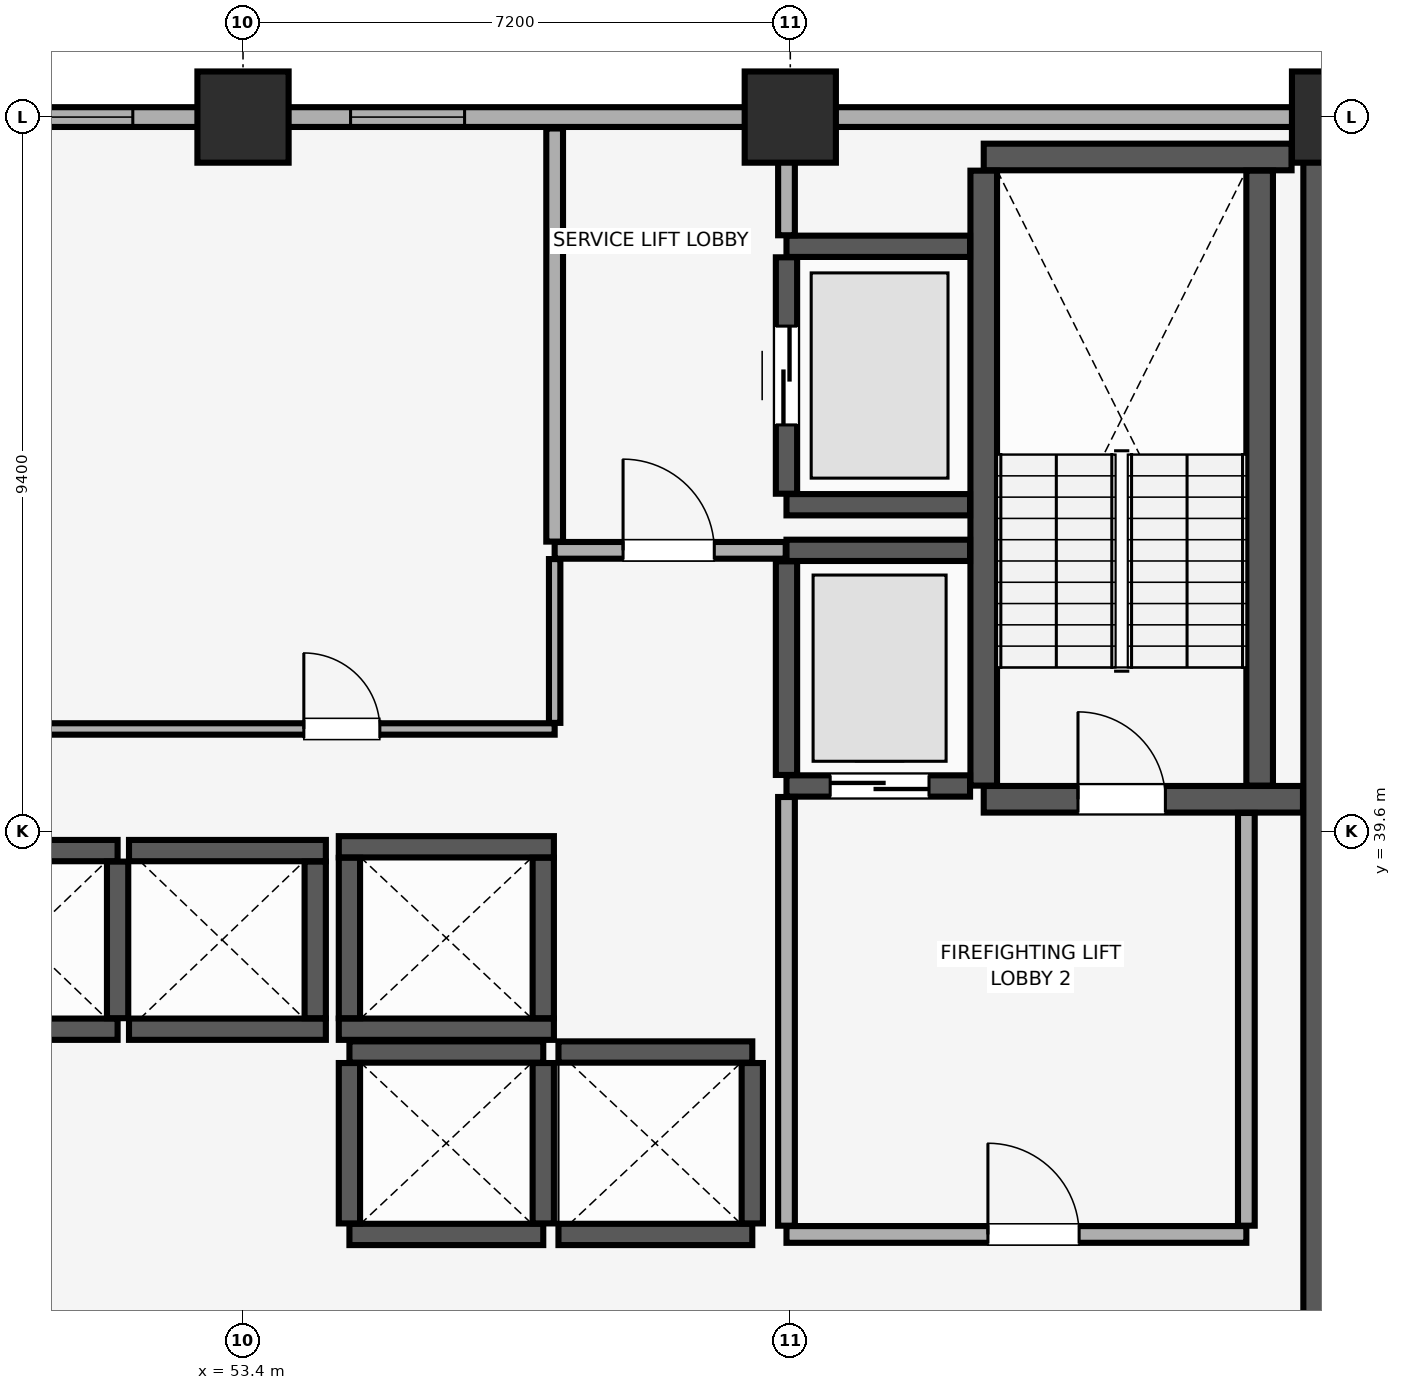
"""IFC4 building model, lengths in metres.
Left out: names, types, materials, properties, quantities, classifications, styles, units other than length and angle.
Written with IfcOpenShell. Run it as: python <this file> out.ifc"""

import sys

from ifc_helpers import new_model, si_unit, direction, frame, frame_2d, origin, origin_2d, place, context, subcontext, project, spatial, rectangle, extrude, element, fill, save


model = new_model("IFC4")
c1 = context("Model", 3, precision=1e-05, world=origin(), true_north=direction((0.0, 1.0)))
c2 = subcontext(c1, "Body", "Model", "MODEL_VIEW")
j1 = project(units=[si_unit("LENGTHUNIT", "METRE"), si_unit("PLANEANGLEUNIT", "RADIAN")], contexts=[c1])
p1 = place(None, origin())
s1 = spatial("IfcSite", under=j1, at=p1, CompositionType="ELEMENT")
p2 = place(p1, origin())
s2 = spatial("IfcBuilding", under=s1, at=p2, CompositionType="ELEMENT")
p3 = place(p2, frame((0.0, 0.0, 93.05)))
s3 = spatial("IfcBuildingStorey", under=s2, at=p3, CompositionType="ELEMENT", Elevation=93.05)
for number, where, z_axis, x_axis in (
    (1, (53.4, 49.0, 0.0), (0.0, 0.0, 1.0), (1.0, 0.0, 0.0)),
    (2, (60.6, 49.0, 0.0), (0.0, 0.0, 1.0), (1.0, 0.0, 0.0)),
    (3, (67.8, 49.0, 0.0), (0.0, 0.0, 1.0), (1.0, 0.0, 0.0)),
):
    element("IfcColumn", number, at=place(p3, frame(where, z_axis=z_axis, x_axis=x_axis)), inside=s3, PredefinedType="COLUMN", context=c2, shape_type="SweptSolid", body=[
        extrude(rectangle(XDim=1.2, YDim=1.2, at=origin_2d()), origin(), (0.0, 0.0, 1.0), 3.51),
    ])
p4 = place(p3, frame((79.8, 49.0, 0.0), z_axis=(0.0, 0.0, 1.0), x_axis=(-1.0, 0.0, 0.0)))
e4 = element("IfcWall", 4, at=p4, inside=s3, PredefinedType="SOLIDWALL", context=c2, shape_type="SweptSolid", body=[
    extrude(rectangle(XDim=75.6, YDim=0.26, at=frame_2d((37.8, 0.0))), origin(), (0.0, 0.0, 1.0), 2.56),
])
p5 = place(p4, frame((72.565, 0.0, 0.85)))
e5 = element("IfcOpeningElement", 5, at=p5, cuts=e4, PredefinedType="OPENING", context=c2, shape_type="SweptSolid", body=[
    extrude(rectangle(XDim=1.5, YDim=1.4, at=frame_2d((0.75, 0.7))), frame((0.0, 0.14, 0.0), z_axis=(0.0, -1.0, 0.0), x_axis=(1.0, 0.0, 0.0)), (0.0, 0.0, 1.0), 0.28),
])
p6 = place(p4, frame((67.45, 0.0, 0.85)))
e6 = element("IfcOpeningElement", 6, at=p6, cuts=e4, PredefinedType="OPENING", context=c2, shape_type="SweptSolid", body=[
    extrude(rectangle(XDim=1.5, YDim=1.4, at=frame_2d((0.75, 0.7))), frame((0.0, 0.14, 0.0), z_axis=(0.0, -1.0, 0.0), x_axis=(1.0, 0.0, 0.0)), (0.0, 0.0, 1.0), 0.28),
])
p7 = place(p4, frame((7.6, 0.0, 0.85)))
e7 = element("IfcOpeningElement", 7, at=p7, cuts=e4, PredefinedType="OPENING", context=c2, shape_type="SweptSolid", body=[
    extrude(rectangle(XDim=1.5, YDim=1.4, at=frame_2d((0.75, 0.7))), frame((0.0, 0.14, 0.0), z_axis=(0.0, -1.0, 0.0), x_axis=(1.0, 0.0, 0.0)), (0.0, 0.0, 1.0), 0.28),
])
p8 = place(p4, frame((1.535, 0.0, 0.85)))
e8 = element("IfcOpeningElement", 8, at=p8, cuts=e4, PredefinedType="OPENING", context=c2, shape_type="SweptSolid", body=[
    extrude(rectangle(XDim=1.5, YDim=1.4, at=frame_2d((0.75, 0.7))), frame((0.0, 0.14, 0.0), z_axis=(0.0, -1.0, 0.0), x_axis=(1.0, 0.0, 0.0)), (0.0, 0.0, 1.0), 0.28),
])
p9 = place(p4, frame((52.265, 0.0, 0.9)))
e9 = element("IfcOpeningElement", 9, at=p9, cuts=e4, PredefinedType="OPENING", context=c2, shape_type="SweptSolid", body=[
    extrude(rectangle(XDim=1.5, YDim=1.4, at=frame_2d((0.75, 0.7))), frame((0.0, 0.14, 0.0), z_axis=(0.0, -1.0, 0.0), x_axis=(1.0, 0.0, 0.0)), (0.0, 0.0, 1.0), 0.28),
])
p10 = place(p4, frame((45.5, 0.0, 0.9)))
e10 = element("IfcOpeningElement", 10, at=p10, cuts=e4, PredefinedType="OPENING", context=c2, shape_type="SweptSolid", body=[
    extrude(rectangle(XDim=1.5, YDim=1.4, at=frame_2d((0.75, 0.7))), frame((0.0, 0.14, 0.0), z_axis=(0.0, -1.0, 0.0), x_axis=(1.0, 0.0, 0.0)), (0.0, 0.0, 1.0), 0.28),
])
p11 = place(p4, frame((31.05, 0.0, 0.9)))
e11 = element("IfcOpeningElement", 11, at=p11, cuts=e4, PredefinedType="OPENING", context=c2, shape_type="SweptSolid", body=[
    extrude(rectangle(XDim=1.5, YDim=1.4, at=frame_2d((0.75, 0.7))), frame((0.0, 0.14, 0.0), z_axis=(0.0, -1.0, 0.0), x_axis=(1.0, 0.0, 0.0)), (0.0, 0.0, 1.0), 0.28),
])
p12 = place(p4, frame((27.85, 0.0, 0.9)))
e12 = element("IfcOpeningElement", 12, at=p12, cuts=e4, PredefinedType="OPENING", context=c2, shape_type="SweptSolid", body=[
    extrude(rectangle(XDim=1.5, YDim=1.4, at=frame_2d((0.75, 0.7))), frame((0.0, 0.14, 0.0), z_axis=(0.0, -1.0, 0.0), x_axis=(1.0, 0.0, 0.0)), (0.0, 0.0, 1.0), 0.28),
])
p13 = place(p4, frame((23.485, 0.0, 0.9)))
e13 = element("IfcOpeningElement", 13, at=p13, cuts=e4, PredefinedType="OPENING", context=c2, shape_type="SweptSolid", body=[
    extrude(rectangle(XDim=1.5, YDim=1.4, at=frame_2d((0.75, 0.7))), frame((0.0, 0.14, 0.0), z_axis=(0.0, -1.0, 0.0), x_axis=(1.0, 0.0, 0.0)), (0.0, 0.0, 1.0), 0.28),
])
p14 = place(p3, frame((67.8, 29.4, 0.0), z_axis=(0.0, 0.0, 1.0), x_axis=(0.0, 1.0, 0.0)))
e14 = element("IfcWall", 14, at=p14, inside=s3, PredefinedType="SHEAR", context=c2, shape_type="SweptSolid", body=[
    extrude(rectangle(XDim=19.2, YDim=0.9, at=frame_2d((9.6, 0.0))), origin(), (0.0, 0.0, 1.0), 3.51),
])
p15 = place(p3, frame((63.145, 40.025, 0.0), z_axis=(0.0, 0.0, 1.0), x_axis=(1.0, 0.0, 0.0)))
e15 = element("IfcWall", 15, at=p15, inside=s3, PredefinedType="SHEAR", context=c2, shape_type="SweptSolid", body=[
    extrude(rectangle(XDim=4.2, YDim=0.35, at=frame_2d((2.1, 0.0))), origin(), (0.0, 0.0, 1.0), 3.51),
])
p16 = place(p15, frame((1.24, 0.0, 0.0)))
e16 = element("IfcOpeningElement", 16, at=p16, cuts=e15, PredefinedType="OPENING", context=c2, shape_type="SweptSolid", body=[
    extrude(rectangle(XDim=1.15, YDim=2.15, at=frame_2d((0.575, 1.075))), frame((0.0, 0.185, 0.0), z_axis=(0.0, -1.0, 0.0), x_axis=(1.0, 0.0, 0.0)), (0.0, 0.0, 1.0), 0.37),
])
p17 = place(p3, frame((63.145, 48.475, 0.0), z_axis=(0.0, 0.0, 1.0), x_axis=(1.0, 0.0, 0.0)))
e17 = element("IfcWall", 17, at=p17, inside=s3, PredefinedType="SHEAR", context=c2, shape_type="SweptSolid", body=[
    extrude(rectangle(XDim=4.05, YDim=0.35, at=frame_2d((2.025, 0.0))), origin(), (0.0, 0.0, 1.0), 3.51),
])
for number, where, z_axis, x_axis in (
    (18, (63.145, 40.205, 0.0), (0.0, 0.0, 1.0), (0.0, 1.0, 0.0)),
    (19, (66.775, 40.205, 0.0), (0.0, 0.0, 1.0), (0.0, 1.0, 0.0)),
):
    element("IfcWall", number, at=place(p3, frame(where, z_axis=z_axis, x_axis=x_axis)), inside=s3, PredefinedType="SHEAR", context=c2, shape_type="SweptSolid", body=[
        extrude(rectangle(XDim=8.09, YDim=0.35, at=frame_2d((4.045, 0.0))), origin(), (0.0, 0.0, 1.0), 3.51),
    ])
for number, where, z_axis, x_axis in (
    (20, (49.3, 37.0, 0.0), (0.0, 0.0, 1.0), (1.0, 0.0, 0.0)),
    (21, (49.3, 39.35, 0.0), (0.0, 0.0, 1.0), (1.0, 0.0, 0.0)),
):
    element("IfcWall", number, at=place(p3, frame(where, z_axis=z_axis, x_axis=x_axis)), inside=s3, PredefinedType="SHEAR", context=c2, shape_type="SweptSolid", body=[
        extrude(rectangle(XDim=2.45, YDim=0.28, at=frame_2d((1.225, 0.0))), origin(), (0.0, 0.0, 1.0), 3.51),
    ])
p18 = place(p3, frame((51.75, 37.145, 0.0), z_axis=(0.0, 0.0, 1.0), x_axis=(0.0, 1.0, 0.0)))
e22 = element("IfcWall", 22, at=p18, inside=s3, PredefinedType="SHEAR", context=c2, shape_type="SweptSolid", body=[
    extrude(rectangle(XDim=2.06, YDim=0.28, at=frame_2d((1.03, 0.0))), origin(), (0.0, 0.0, 1.0), 3.51),
])
for number, where, z_axis, x_axis in (
    (23, (51.9, 37.0, 0.0), (0.0, 0.0, 1.0), (1.0, 0.0, 0.0)),
    (24, (51.9, 39.35, 0.0), (0.0, 0.0, 1.0), (1.0, 0.0, 0.0)),
):
    element("IfcWall", number, at=place(p3, frame(where, z_axis=z_axis, x_axis=x_axis)), inside=s3, PredefinedType="SHEAR", context=c2, shape_type="SweptSolid", body=[
        extrude(rectangle(XDim=2.59, YDim=0.28, at=frame_2d((1.295, 0.0))), origin(), (0.0, 0.0, 1.0), 3.51),
    ])
p19 = place(p3, frame((54.35, 37.145, 0.0), z_axis=(0.0, 0.0, 1.0), x_axis=(0.0, 1.0, 0.0)))
e25 = element("IfcWall", 25, at=p19, inside=s3, PredefinedType="SHEAR", context=c2, shape_type="SweptSolid", body=[
    extrude(rectangle(XDim=2.06, YDim=0.28, at=frame_2d((1.03, 0.0))), origin(), (0.0, 0.0, 1.0), 3.51),
])
for number, where, z_axis, x_axis in (
    (26, (54.8, 34.3, 0.0), (0.0, 0.0, 1.0), (1.0, 0.0, 0.0)),
    (27, (54.8, 36.7, 0.0), (0.0, 0.0, 1.0), (1.0, 0.0, 0.0)),
):
    element("IfcWall", number, at=place(p3, frame(where, z_axis=z_axis, x_axis=x_axis)), inside=s3, PredefinedType="SHEAR", context=c2, shape_type="SweptSolid", body=[
        extrude(rectangle(XDim=2.55, YDim=0.28, at=frame_2d((1.275, 0.0))), origin(), (0.0, 0.0, 1.0), 3.51),
    ])
for number, where, z_axis, x_axis in (
    (28, (54.8, 34.445, 0.0), (0.0, 0.0, 1.0), (0.0, 1.0, 0.0)),
    (29, (57.35, 34.445, 0.0), (0.0, 0.0, 1.0), (0.0, 1.0, 0.0)),
):
    element("IfcWall", number, at=place(p3, frame(where, z_axis=z_axis, x_axis=x_axis)), inside=s3, PredefinedType="SHEAR", context=c2, shape_type="SweptSolid", body=[
        extrude(rectangle(XDim=2.11, YDim=0.28, at=frame_2d((1.055, 0.0))), origin(), (0.0, 0.0, 1.0), 3.51),
    ])
for number, where, z_axis, x_axis in (
    (30, (57.55, 34.3, 0.0), (0.0, 0.0, 1.0), (1.0, 0.0, 0.0)),
    (31, (57.55, 36.7, 0.0), (0.0, 0.0, 1.0), (1.0, 0.0, 0.0)),
):
    element("IfcWall", number, at=place(p3, frame(where, z_axis=z_axis, x_axis=x_axis)), inside=s3, PredefinedType="SHEAR", context=c2, shape_type="SweptSolid", body=[
        extrude(rectangle(XDim=2.55, YDim=0.28, at=frame_2d((1.275, 0.0))), origin(), (0.0, 0.0, 1.0), 3.51),
    ])
p20 = place(p3, frame((60.1, 34.445, 0.0), z_axis=(0.0, 0.0, 1.0), x_axis=(0.0, 1.0, 0.0)))
e32 = element("IfcWall", 32, at=p20, inside=s3, PredefinedType="SHEAR", context=c2, shape_type="SweptSolid", body=[
    extrude(rectangle(XDim=2.11, YDim=0.28, at=frame_2d((1.055, 0.0))), origin(), (0.0, 0.0, 1.0), 3.51),
])
for number, where, z_axis, x_axis in (
    (33, (54.66, 37.0, 0.0), (0.0, 0.0, 1.0), (1.0, 0.0, 0.0)),
    (34, (54.66, 39.4, 0.0), (0.0, 0.0, 1.0), (1.0, 0.0, 0.0)),
):
    element("IfcWall", number, at=place(p3, frame(where, z_axis=z_axis, x_axis=x_axis)), inside=s3, PredefinedType="SHEAR", context=c2, shape_type="SweptSolid", body=[
        extrude(rectangle(XDim=2.83, YDim=0.28, at=frame_2d((1.415, 0.0))), origin(), (0.0, 0.0, 1.0), 3.51),
    ])
for number, where, z_axis, x_axis in (
    (35, (54.8, 37.145, 0.0), (0.0, 0.0, 1.0), (0.0, 1.0, 0.0)),
    (36, (57.35, 37.145, 0.0), (0.0, 0.0, 1.0), (0.0, 1.0, 0.0)),
):
    element("IfcWall", number, at=place(p3, frame(where, z_axis=z_axis, x_axis=x_axis)), inside=s3, PredefinedType="SHEAR", context=c2, shape_type="SweptSolid", body=[
        extrude(rectangle(XDim=2.11, YDim=0.28, at=frame_2d((1.055, 0.0))), origin(), (0.0, 0.0, 1.0), 3.51),
    ])
p21 = place(p3, frame((60.55, 40.2, 0.0), z_axis=(0.0, 0.0, 1.0), x_axis=(1.0, 0.0, 0.0)))
e37 = element("IfcWall", 37, at=p21, inside=s3, PredefinedType="SHEAR", context=c2, shape_type="SweptSolid", body=[
    extrude(rectangle(XDim=2.415, YDim=0.28, at=frame_2d((1.208, 0.0))), origin(), (0.0, 0.0, 1.0), 3.51),
])
p22 = place(p21, frame((0.575, 0.0, 0.0)))
e38 = element("IfcOpeningElement", 38, at=p22, cuts=e37, PredefinedType="OPENING", context=c2, shape_type="SweptSolid", body=[
    extrude(rectangle(XDim=1.3, YDim=2.3, at=frame_2d((0.65, 1.15))), frame((0.0, 0.15, 0.0), z_axis=(0.0, -1.0, 0.0), x_axis=(1.0, 0.0, 0.0)), (0.0, 0.0, 1.0), 0.3),
])
p23 = place(p3, frame((60.55, 43.3, 0.0), z_axis=(0.0, 0.0, 1.0), x_axis=(1.0, 0.0, 0.0)))
e39 = element("IfcWall", 39, at=p23, inside=s3, PredefinedType="SHEAR", context=c2, shape_type="SweptSolid", body=[
    extrude(rectangle(XDim=2.415, YDim=0.28, at=frame_2d((1.208, 0.0))), origin(), (0.0, 0.0, 1.0), 3.51),
])
p24 = place(p3, frame((60.55, 40.345, 0.0), z_axis=(0.0, 0.0, 1.0), x_axis=(0.0, 1.0, 0.0)))
e40 = element("IfcWall", 40, at=p24, inside=s3, PredefinedType="SHEAR", context=c2, shape_type="SweptSolid", body=[
    extrude(rectangle(XDim=2.81, YDim=0.28, at=frame_2d((1.405, 0.0))), origin(), (0.0, 0.0, 1.0), 3.51),
])
for number, where, z_axis, x_axis in (
    (41, (60.55, 43.9, 0.0), (0.0, 0.0, 1.0), (1.0, 0.0, 0.0)),
    (42, (60.55, 47.3, 0.0), (0.0, 0.0, 1.0), (1.0, 0.0, 0.0)),
):
    element("IfcWall", number, at=place(p3, frame(where, z_axis=z_axis, x_axis=x_axis)), inside=s3, PredefinedType="SHEAR", context=c2, shape_type="SweptSolid", body=[
        extrude(rectangle(XDim=2.415, YDim=0.28, at=frame_2d((1.208, 0.0))), origin(), (0.0, 0.0, 1.0), 3.51),
    ])
p25 = place(p3, frame((60.55, 44.045, 0.0), z_axis=(0.0, 0.0, 1.0), x_axis=(0.0, 1.0, 0.0)))
e43 = element("IfcWall", 43, at=p25, inside=s3, PredefinedType="SHEAR", context=c2, shape_type="SweptSolid", body=[
    extrude(rectangle(XDim=3.11, YDim=0.28, at=frame_2d((1.555, 0.0))), origin(), (0.0, 0.0, 1.0), 3.51),
])
p26 = place(p25, frame((0.905, 0.0, 0.0)))
e44 = element("IfcOpeningElement", 44, at=p26, cuts=e43, PredefinedType="OPENING", context=c2, shape_type="SweptSolid", body=[
    extrude(rectangle(XDim=1.3, YDim=2.3, at=frame_2d((0.65, 1.15))), frame((0.0, 0.15, 0.0), z_axis=(0.0, -1.0, 0.0), x_axis=(1.0, 0.0, 0.0)), (0.0, 0.0, 1.0), 0.3),
])
p27 = place(p3, frame((60.55, 34.3, 0.0), z_axis=(0.0, 0.0, 1.0), x_axis=(1.0, 0.0, 0.0)))
e45 = element("IfcWall", 45, at=p27, inside=s3, PredefinedType="PARTITIONING", context=c2, shape_type="SweptSolid", body=[
    extrude(rectangle(XDim=6.05, YDim=0.22, at=frame_2d((3.025, 0.0))), origin(), (0.0, 0.0, 1.0), 3.51),
])
p28 = place(p27, frame((2.65, 0.0, 0.0)))
e46 = element("IfcOpeningElement", 46, at=p28, cuts=e45, PredefinedType="OPENING", context=c2, shape_type="SweptSolid", body=[
    extrude(rectangle(XDim=1.2, YDim=2.15, at=frame_2d((0.6, 1.075))), frame((0.0, 0.12, 0.0), z_axis=(0.0, -1.0, 0.0), x_axis=(1.0, 0.0, 0.0)), (0.0, 0.0, 1.0), 0.24),
])
p29 = place(p3, frame((60.55, 34.415, 0.0), z_axis=(0.0, 0.0, 1.0), x_axis=(0.0, 1.0, 0.0)))
e47 = element("IfcWall", 47, at=p29, inside=s3, PredefinedType="PARTITIONING", context=c2, shape_type="SweptSolid", body=[
    extrude(rectangle(XDim=5.64, YDim=0.22, at=frame_2d((2.82, 0.0))), origin(), (0.0, 0.0, 1.0), 3.51),
])
p30 = place(p3, frame((66.6, 34.415, 0.0), z_axis=(0.0, 0.0, 1.0), x_axis=(0.0, 1.0, 0.0)))
e48 = element("IfcWall", 48, at=p30, inside=s3, PredefinedType="PARTITIONING", context=c2, shape_type="SweptSolid", body=[
    extrude(rectangle(XDim=5.43, YDim=0.22, at=frame_2d((2.715, 0.0))), origin(), (0.0, 0.0, 1.0), 3.51),
])
p31 = place(p3, frame((57.5, 43.3, 0.0), z_axis=(0.0, 0.0, 1.0), x_axis=(1.0, 0.0, 0.0)))
e49 = element("IfcWall", 49, at=p31, inside=s3, PredefinedType="PARTITIONING", context=c2, shape_type="SweptSolid", body=[
    extrude(rectangle(XDim=3.04, YDim=0.22, at=frame_2d((1.52, 0.0))), origin(), (0.0, 0.0, 1.0), 3.51),
])
p32 = place(p31, frame((0.9, 0.0, 0.0)))
e50 = element("IfcOpeningElement", 50, at=p32, cuts=e49, PredefinedType="OPENING", context=c2, shape_type="SweptSolid", body=[
    extrude(rectangle(XDim=1.2, YDim=2.15, at=frame_2d((0.6, 1.075))), frame((0.0, 0.12, 0.0), z_axis=(0.0, -1.0, 0.0), x_axis=(1.0, 0.0, 0.0)), (0.0, 0.0, 1.0), 0.24),
])
p33 = place(p3, frame((57.5, 43.415, 0.0), z_axis=(0.0, 0.0, 1.0), x_axis=(0.0, 1.0, 0.0)))
e51 = element("IfcWall", 51, at=p33, inside=s3, PredefinedType="PARTITIONING", context=c2, shape_type="SweptSolid", body=[
    extrude(rectangle(XDim=5.435, YDim=0.22, at=frame_2d((2.718, 0.0))), origin(), (0.0, 0.0, 1.0), 3.51),
])
p34 = place(p3, frame((60.55, 47.445, 0.0), z_axis=(0.0, 0.0, 1.0), x_axis=(0.0, 1.0, 0.0)))
e52 = element("IfcWall", 52, at=p34, inside=s3, PredefinedType="PARTITIONING", context=c2, shape_type="SweptSolid", body=[
    extrude(rectangle(XDim=1.405, YDim=0.22, at=frame_2d((0.703, 0.0))), origin(), (0.0, 0.0, 1.0), 3.51),
])
p35 = place(p3, frame((49.48, 40.95, 0.0), z_axis=(0.0, 0.0, 1.0), x_axis=(1.0, 0.0, 0.0)))
e53 = element("IfcWall", 53, at=p35, inside=s3, PredefinedType="PARTITIONING", context=c2, shape_type="SweptSolid", body=[
    extrude(rectangle(XDim=8.02, YDim=0.15, at=frame_2d((4.01, 0.0))), origin(), (0.0, 0.0, 1.0), 3.51),
])
p36 = place(p35, frame((4.72, 0.0, 0.0)))
e54 = element("IfcOpeningElement", 54, at=p36, cuts=e53, PredefinedType="OPENING", context=c2, shape_type="SweptSolid", body=[
    extrude(rectangle(XDim=1.0, YDim=2.15, at=frame_2d((0.5, 1.075))), frame((0.0, 0.085, 0.0), z_axis=(0.0, -1.0, 0.0), x_axis=(1.0, 0.0, 0.0)), (0.0, 0.0, 1.0), 0.17),
])
p37 = place(p3, frame((57.5, 41.03, 0.0), z_axis=(0.0, 0.0, 1.0), x_axis=(0.0, 1.0, 0.0)))
e55 = element("IfcWall", 55, at=p37, inside=s3, PredefinedType="PARTITIONING", context=c2, shape_type="SweptSolid", body=[
    extrude(rectangle(XDim=2.155, YDim=0.15, at=frame_2d((1.078, 0.0))), origin(), (0.0, 0.0, 1.0), 3.51),
])
p38 = place(p12, origin())
e56 = element("IfcWindow", 56, at=p38, inside=s3, PartitioningType="SINGLE_PANEL", PredefinedType="WINDOW", context=c2, shape_type="SweptSolid", body=[
    extrude(rectangle(XDim=1.5, YDim=1.4, at=frame_2d((0.75, 0.7))), frame((0.0, 0.03, 0.0), z_axis=(0.0, -1.0, 0.0), x_axis=(1.0, 0.0, 0.0)), (0.0, 0.0, 1.0), 0.06),
])
fill(e12, e56)
p39 = place(p13, origin())
e57 = element("IfcWindow", 57, at=p39, inside=s3, PartitioningType="SINGLE_PANEL", PredefinedType="WINDOW", context=c2, shape_type="SweptSolid", body=[
    extrude(rectangle(XDim=1.5, YDim=1.4, at=frame_2d((0.75, 0.7))), frame((0.0, 0.03, 0.0), z_axis=(0.0, -1.0, 0.0), x_axis=(1.0, 0.0, 0.0)), (0.0, 0.0, 1.0), 0.06),
])
fill(e13, e57)
p40 = place(p16, origin())
e58 = element("IfcDoor", 58, at=p40, inside=s3, OperationType="SINGLE_SWING_LEFT", PredefinedType="DOOR", context=c2, shape_type="SweptSolid", body=[
    extrude(rectangle(XDim=1.15, YDim=2.15, at=frame_2d((0.575, 1.075))), frame((0.0, 0.025, 0.0), z_axis=(0.0, -1.0, 0.0), x_axis=(1.0, 0.0, 0.0)), (0.0, 0.0, 1.0), 0.05),
])
fill(e16, e58)
p41 = place(p22, origin())
e59 = element("IfcDoor", 59, at=p41, inside=s3, OperationType="DOUBLE_DOOR_SLIDING", PredefinedType="DOOR", context=c2, shape_type="SweptSolid", body=[
    extrude(rectangle(XDim=1.3, YDim=2.3, at=frame_2d((0.65, 1.15))), frame((0.0, 0.025, 0.0), z_axis=(0.0, -1.0, 0.0), x_axis=(1.0, 0.0, 0.0)), (0.0, 0.0, 1.0), 0.05),
])
fill(e38, e59)
p42 = place(p26, origin())
e60 = element("IfcDoor", 60, at=p42, inside=s3, OperationType="DOUBLE_DOOR_SLIDING", PredefinedType="DOOR", context=c2, shape_type="SweptSolid", body=[
    extrude(rectangle(XDim=1.3, YDim=2.3, at=frame_2d((0.65, 1.15))), frame((0.0, 0.025, 0.0), z_axis=(0.0, -1.0, 0.0), x_axis=(1.0, 0.0, 0.0)), (0.0, 0.0, 1.0), 0.05),
])
fill(e44, e60)
p43 = place(p28, origin())
e61 = element("IfcDoor", 61, at=p43, inside=s3, OperationType="SINGLE_SWING_LEFT", PredefinedType="DOOR", context=c2, shape_type="SweptSolid", body=[
    extrude(rectangle(XDim=1.2, YDim=2.15, at=frame_2d((0.6, 1.075))), frame((0.0, 0.025, 0.0), z_axis=(0.0, -1.0, 0.0), x_axis=(1.0, 0.0, 0.0)), (0.0, 0.0, 1.0), 0.05),
])
fill(e46, e61)
p44 = place(p32, origin())
e62 = element("IfcDoor", 62, at=p44, inside=s3, OperationType="SINGLE_SWING_LEFT", PredefinedType="DOOR", context=c2, shape_type="SweptSolid", body=[
    extrude(rectangle(XDim=1.2, YDim=2.15, at=frame_2d((0.6, 1.075))), frame((0.0, 0.025, 0.0), z_axis=(0.0, -1.0, 0.0), x_axis=(1.0, 0.0, 0.0)), (0.0, 0.0, 1.0), 0.05),
])
fill(e50, e62)
p45 = place(p36, origin())
e63 = element("IfcDoor", 63, at=p45, inside=s3, OperationType="SINGLE_SWING_LEFT", PredefinedType="DOOR", context=c2, shape_type="SweptSolid", body=[
    extrude(rectangle(XDim=1.0, YDim=2.15, at=frame_2d((0.5, 1.075))), frame((0.0, 0.025, 0.0), z_axis=(0.0, -1.0, 0.0), x_axis=(1.0, 0.0, 0.0)), (0.0, 0.0, 1.0), 0.05),
])
fill(e54, e63)
save(model, sys.argv[1])
